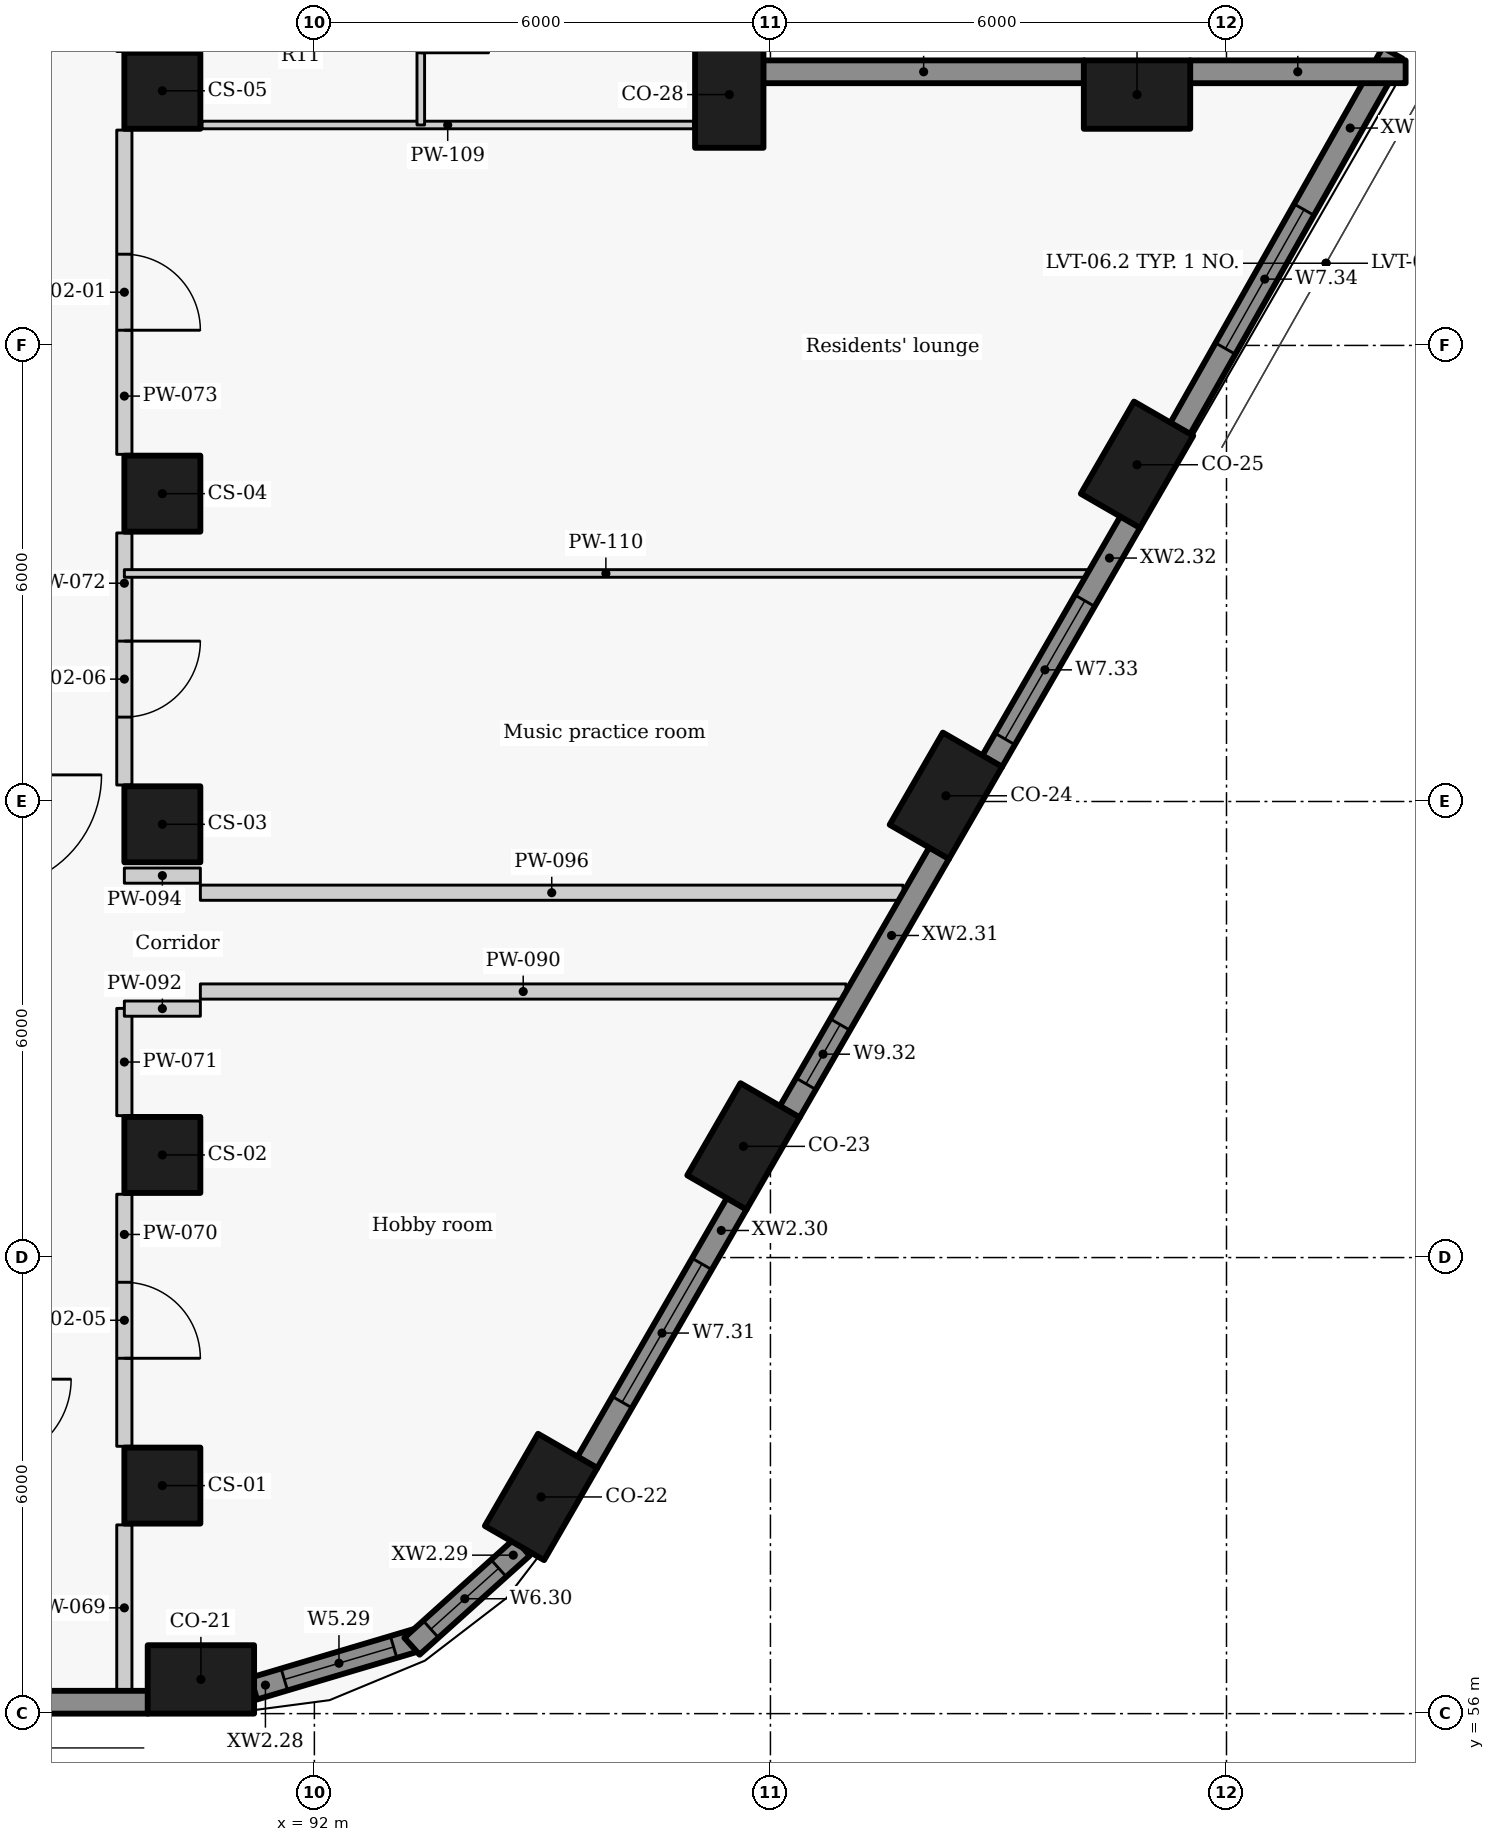
"""IFC4 building model, lengths in metres.
Left out: names, types, materials, properties, quantities, classifications, styles, units other than length and angle.
Written with IfcOpenShell. Run it as: python <this file> out.ifc"""

import sys

from ifc_helpers import new_model, si_unit, direction, frame, frame_2d, origin, origin_2d, place, context, subcontext, project, spatial, rectangle, extrude, element, fill, save


model = new_model("IFC4")
c1 = context("Model", 3, precision=1e-05, world=origin(), true_north=direction((0.0, 1.0)))
c2 = subcontext(c1, "Body", "Model", "MODEL_VIEW")
j1 = project(units=[si_unit("LENGTHUNIT", "METRE"), si_unit("PLANEANGLEUNIT", "RADIAN")], contexts=[c1])
p1 = place(None, origin())
s1 = spatial("IfcSite", under=j1, at=p1, CompositionType="ELEMENT")
p2 = place(p1, origin())
s2 = spatial("IfcBuilding", under=s1, at=p2, CompositionType="ELEMENT")
p3 = place(p2, frame((0.0, 0.0, 97.5)))
s3 = spatial("IfcBuildingStorey", under=s2, at=p3, CompositionType="ELEMENT", Elevation=97.5)
for number, where, z_axis, x_axis in (
    (1, (90.507, 56.45, 0.0), (0.0, 0.0, 1.0), (1.0, 0.0, 0.0)),
    (2, (94.982, 58.851, 0.0), (0.0, 0.0, 1.0), (0.5, 0.866, 0.0)),
    (3, (97.646, 63.463, 0.0), (0.0, 0.0, 1.0), (0.5, 0.866, 0.0)),
    (4, (100.308, 68.075, 0.0), (0.0, 0.0, 1.0), (0.5, 0.866, 0.0)),
    (5, (102.823, 72.43, 0.0), (0.0, 0.0, 1.0), (0.5, 0.866, 0.0)),
    (6, (102.823, 77.3, 0.0), (0.0, 0.0, 1.0), (-1.0, 0.0, 0.0)),
    (7, (97.458, 77.3, 0.0), (0.0, 0.0, 1.0), (0.0, 1.0, 0.0)),
):
    element("IfcColumn", number, at=place(p3, frame(where, z_axis=z_axis, x_axis=x_axis)), inside=s3, PredefinedType="COLUMN", context=c2, shape_type="SweptSolid", body=[
        extrude(rectangle(XDim=1.4, YDim=0.9, at=origin_2d()), origin(), (0.0, 0.0, 1.0), 3.3),
    ])
for number, where, z_axis, x_axis in (
    (8, (90.0, 59.0, 0.0), (0.0, 0.0, 1.0), (0.0, 1.0, 0.0)),
    (9, (90.0, 63.35, 0.0), (0.0, 0.0, 1.0), (0.0, 1.0, 0.0)),
    (10, (90.0, 67.7, 0.0), (0.0, 0.0, 1.0), (0.0, 1.0, 0.0)),
    (11, (90.0, 72.05, 0.0), (0.0, 0.0, 1.0), (0.0, 1.0, 0.0)),
    (12, (90.0, 77.35, 0.0), (0.0, 0.0, 1.0), (0.0, 1.0, 0.0)),
):
    element("IfcColumn", number, at=place(p3, frame(where, z_axis=z_axis, x_axis=x_axis)), inside=s3, PredefinedType="COLUMN", context=c2, shape_type="SweptSolid", body=[
        extrude(rectangle(XDim=1.0, YDim=1.0, at=origin_2d()), origin(), (0.0, 0.0, 1.0), 3.3),
    ])
p4 = place(p3, frame((69.871, 56.15, 0.0), z_axis=(0.0, 0.0, 1.0), x_axis=(1.0, 0.0, 0.0)))
e13 = element("IfcWall", 13, at=p4, inside=s3, PredefinedType="SOLIDWALL", context=c2, shape_type="SweptSolid", body=[
    extrude(rectangle(XDim=19.94, YDim=0.3, at=frame_2d((9.97, 0.0))), origin(), (0.0, 0.0, 1.0), 2.425),
])
p5 = place(p3, frame((91.203, 56.33, 0.0), z_axis=(0.0, 0.0, 1.0), x_axis=(0.95847736903, 0.285168604614, 0.0)))
e14 = element("IfcWall", 14, at=p5, inside=s3, PredefinedType="SOLIDWALL", context=c2, shape_type="SweptSolid", body=[
    extrude(rectangle(XDim=2.262, YDim=0.3, at=frame_2d((1.131, 0.0))), origin(), (0.0, 0.0, 1.0), 2.425),
])
p6 = place(p5, frame((0.419, 0.0, 0.9)))
e15 = element("IfcOpeningElement", 15, at=p6, cuts=e14, PredefinedType="OPENING", context=c2, shape_type="SweptSolid", body=[
    extrude(rectangle(XDim=1.5, YDim=1.1, at=frame_2d((0.75, 0.55))), frame((0.0, 0.16, 0.0), z_axis=(0.0, -1.0, 0.0), x_axis=(1.0, 0.0, 0.0)), (0.0, 0.0, 1.0), 0.32),
])
p7 = place(p3, frame((93.283, 56.887, 0.0), z_axis=(0.0, 0.0, 1.0), x_axis=(0.743785734967, 0.668418117992, 0.0)))
e16 = element("IfcWall", 16, at=p7, inside=s3, PredefinedType="SOLIDWALL", context=c2, shape_type="SweptSolid", body=[
    extrude(rectangle(XDim=1.95, YDim=0.3, at=frame_2d((0.975, 0.0))), origin(), (0.0, 0.0, 1.0), 2.425),
])
p8 = place(p7, frame((0.335, 0.0, 0.9)))
e17 = element("IfcOpeningElement", 17, at=p8, cuts=e16, PredefinedType="OPENING", context=c2, shape_type="SweptSolid", body=[
    extrude(rectangle(XDim=1.2, YDim=1.1, at=frame_2d((0.6, 0.55))), frame((0.0, 0.16, 0.0), z_axis=(0.0, -1.0, 0.0), x_axis=(1.0, 0.0, 0.0)), (0.0, 0.0, 1.0), 0.32),
])
p9 = place(p3, frame((95.59, 59.303, 0.0), z_axis=(0.0, 0.0, 1.0), x_axis=(0.500003583557, 0.866023334807, 0.0)))
e18 = element("IfcWall", 18, at=p9, inside=s3, PredefinedType="SOLIDWALL", context=c2, shape_type="SweptSolid", body=[
    extrude(rectangle(XDim=3.934, YDim=0.3, at=frame_2d((1.967, 0.0))), origin(), (0.0, 0.0, 1.0), 2.425),
])
p10 = place(p9, frame((0.917, 0.0, 0.9)))
e19 = element("IfcOpeningElement", 19, at=p10, cuts=e18, PredefinedType="OPENING", context=c2, shape_type="SweptSolid", body=[
    extrude(rectangle(XDim=2.1, YDim=1.1, at=frame_2d((1.05, 0.55))), frame((0.0, 0.16, 0.0), z_axis=(0.0, -1.0, 0.0), x_axis=(1.0, 0.0, 0.0)), (0.0, 0.0, 1.0), 0.32),
])
p11 = place(p3, frame((98.253, 63.916, 0.0), z_axis=(0.0, 0.0, 1.0), x_axis=(0.499957037901, 0.866050206543, 0.0)))
e20 = element("IfcWall", 20, at=p11, inside=s3, PredefinedType="SOLIDWALL", context=c2, shape_type="SweptSolid", body=[
    extrude(rectangle(XDim=3.934, YDim=0.3, at=frame_2d((1.967, 0.0))), origin(), (0.0, 0.0, 1.0), 2.425),
])
p12 = place(p11, frame((0.428, 0.0, 0.9)))
e21 = element("IfcOpeningElement", 21, at=p12, cuts=e20, PredefinedType="OPENING", context=c2, shape_type="SweptSolid", body=[
    extrude(rectangle(XDim=0.9, YDim=1.1, at=frame_2d((0.45, 0.55))), frame((0.0, 0.16, 0.0), z_axis=(0.0, -1.0, 0.0), x_axis=(1.0, 0.0, 0.0)), (0.0, 0.0, 1.0), 0.32),
])
p13 = place(p3, frame((100.916, 68.528, 0.0), z_axis=(0.0, 0.0, 1.0), x_axis=(0.500009139881, 0.866020126807, 0.0)))
e22 = element("IfcWall", 22, at=p13, inside=s3, PredefinedType="SOLIDWALL", context=c2, shape_type="SweptSolid", body=[
    extrude(rectangle(XDim=3.637, YDim=0.3, at=frame_2d((1.818, 0.0))), origin(), (0.0, 0.0, 1.0), 2.425),
])
p14 = place(p13, frame((0.34, 0.0, 0.9)))
e23 = element("IfcOpeningElement", 23, at=p14, cuts=e22, PredefinedType="OPENING", context=c2, shape_type="SweptSolid", body=[
    extrude(rectangle(XDim=2.1, YDim=1.1, at=frame_2d((1.05, 0.55))), frame((0.0, 0.16, 0.0), z_axis=(0.0, -1.0, 0.0), x_axis=(1.0, 0.0, 0.0)), (0.0, 0.0, 1.0), 0.32),
])
p15 = place(p3, frame((103.391, 72.906, 0.0), z_axis=(0.0, 0.0, 1.0), x_axis=(0.492456858874, 0.870336855561, 0.0)))
e24 = element("IfcWall", 24, at=p15, inside=s3, PredefinedType="SOLIDWALL", context=c2, shape_type="SweptSolid", body=[
    extrude(rectangle(XDim=5.677, YDim=0.3, at=frame_2d((2.838, 0.0))), origin(), (0.0, 0.0, 1.0), 2.425),
])
p16 = place(p15, frame((1.209, 0.0, 0.9)))
e25 = element("IfcOpeningElement", 25, at=p16, cuts=e24, PredefinedType="OPENING", context=c2, shape_type="SweptSolid", body=[
    extrude(rectangle(XDim=2.1, YDim=1.1, at=frame_2d((1.05, 0.55))), frame((0.0, 0.16, 0.0), z_axis=(0.0, -1.0, 0.0), x_axis=(1.0, 0.0, 0.0)), (0.0, 0.0, 1.0), 0.32),
])
p17 = place(p3, frame((106.357, 77.6, 0.0), z_axis=(0.0, 0.0, 1.0), x_axis=(-1.0, 0.0, 0.0)))
e26 = element("IfcWall", 26, at=p17, inside=s3, PredefinedType="SOLIDWALL", context=c2, shape_type="SweptSolid", body=[
    extrude(rectangle(XDim=2.838, YDim=0.3, at=frame_2d((1.419, 0.0))), origin(), (0.0, 0.0, 1.0), 2.425),
])
p18 = place(p3, frame((102.127, 77.6, 0.0), z_axis=(0.0, 0.0, 1.0), x_axis=(-1.0, 0.0, 0.0)))
e27 = element("IfcWall", 27, at=p18, inside=s3, PredefinedType="SOLIDWALL", context=c2, shape_type="SweptSolid", body=[
    extrude(rectangle(XDim=4.223, YDim=0.3, at=frame_2d((2.111, 0.0))), origin(), (0.0, 0.0, 1.0), 2.425),
])
p19 = place(p3, frame((89.5, 56.3, 0.0), z_axis=(0.0, 0.0, 1.0), x_axis=(0.0, 1.0, 0.0)))
e28 = element("IfcWall", 28, at=p19, inside=s3, PredefinedType="PARTITIONING", context=c2, shape_type="SweptSolid", body=[
    extrude(rectangle(XDim=2.183, YDim=0.2, at=frame_2d((1.091, 0.0))), origin(), (0.0, 0.0, 1.0), 3.025),
])
p20 = place(p3, frame((89.5, 62.833, 0.0), z_axis=(0.0, 0.0, 1.0), x_axis=(0.0, -1.0, 0.0)))
e29 = element("IfcWall", 29, at=p20, inside=s3, PredefinedType="PARTITIONING", context=c2, shape_type="SweptSolid", body=[
    extrude(rectangle(XDim=3.316, YDim=0.2, at=frame_2d((1.658, 0.0))), origin(), (0.0, 0.0, 1.0), 3.025),
])
p21 = place(p20, frame((1.158, 0.0, 0.0)))
e30 = element("IfcOpeningElement", 30, at=p21, cuts=e29, PredefinedType="OPENING", context=c2, shape_type="SweptSolid", body=[
    extrude(rectangle(XDim=1.0, YDim=2.1, at=frame_2d((0.5, 1.05))), frame((0.0, 0.11, 0.0), z_axis=(0.0, -1.0, 0.0), x_axis=(1.0, 0.0, 0.0)), (0.0, 0.0, 1.0), 0.22),
])
p22 = place(p3, frame((89.5, 63.867, 0.0), z_axis=(0.0, 0.0, 1.0), x_axis=(0.0, 1.0, 0.0)))
e31 = element("IfcWall", 31, at=p22, inside=s3, PredefinedType="PARTITIONING", context=c2, shape_type="SweptSolid", body=[
    extrude(rectangle(XDim=1.411, YDim=0.2, at=frame_2d((0.706, 0.0))), origin(), (0.0, 0.0, 1.0), 3.025),
])
p23 = place(p3, frame((89.5, 71.533, 0.0), z_axis=(0.0, 0.0, 1.0), x_axis=(0.0, -1.0, 0.0)))
e32 = element("IfcWall", 32, at=p23, inside=s3, PredefinedType="PARTITIONING", context=c2, shape_type="SweptSolid", body=[
    extrude(rectangle(XDim=3.316, YDim=0.2, at=frame_2d((1.658, 0.0))), origin(), (0.0, 0.0, 1.0), 3.025),
])
p24 = place(p23, frame((1.423, 0.0, 0.0)))
e33 = element("IfcOpeningElement", 33, at=p24, cuts=e32, PredefinedType="OPENING", context=c2, shape_type="SweptSolid", body=[
    extrude(rectangle(XDim=1.0, YDim=2.1, at=frame_2d((0.5, 1.05))), frame((0.0, 0.11, 0.0), z_axis=(0.0, -1.0, 0.0), x_axis=(1.0, 0.0, 0.0)), (0.0, 0.0, 1.0), 0.22),
])
p25 = place(p3, frame((89.5, 76.833, 0.0), z_axis=(0.0, 0.0, 1.0), x_axis=(0.0, -1.0, 0.0)))
e34 = element("IfcWall", 34, at=p25, inside=s3, PredefinedType="PARTITIONING", context=c2, shape_type="SweptSolid", body=[
    extrude(rectangle(XDim=4.266, YDim=0.2, at=frame_2d((2.133, 0.0))), origin(), (0.0, 0.0, 1.0), 3.025),
])
p26 = place(p25, frame((1.633, 0.0, 0.0)))
e35 = element("IfcOpeningElement", 35, at=p26, cuts=e34, PredefinedType="OPENING", context=c2, shape_type="SweptSolid", body=[
    extrude(rectangle(XDim=1.0, YDim=2.1, at=frame_2d((0.5, 1.05))), frame((0.0, 0.11, 0.0), z_axis=(0.0, -1.0, 0.0), x_axis=(1.0, 0.0, 0.0)), (0.0, 0.0, 1.0), 0.22),
])
p27 = place(p3, frame((90.5, 65.5, 0.0), z_axis=(0.0, 0.0, 1.0), x_axis=(1.0, 0.0, 0.0)))
e36 = element("IfcWall", 36, at=p27, inside=s3, PredefinedType="PARTITIONING", context=c2, shape_type="SweptSolid", body=[
    extrude(rectangle(XDim=8.495, YDim=0.2, at=frame_2d((4.248, 0.0))), origin(), (0.0, 0.0, 1.0), 2.405),
])
for number, where, z_axis, x_axis in (
    (37, (89.5, 65.275, 0.0), (0.0, 0.0, 1.0), (1.0, 0.0, 0.0)),
    (38, (89.5, 67.025, 0.0), (0.0, 0.0, 1.0), (1.0, 0.0, 0.0)),
):
    element("IfcWall", number, at=place(p3, frame(where, z_axis=z_axis, x_axis=x_axis)), inside=s3, PredefinedType="PARTITIONING", context=c2, shape_type="SweptSolid", body=[
        extrude(rectangle(XDim=1.0, YDim=0.2, at=frame_2d((0.5, 0.0))), origin(), (0.0, 0.0, 1.0), 2.505),
    ])
p28 = place(p3, frame((90.5, 66.8, 0.0), z_axis=(0.0, 0.0, 1.0), x_axis=(1.0, 0.0, 0.0)))
e39 = element("IfcWall", 39, at=p28, inside=s3, PredefinedType="PARTITIONING", context=c2, shape_type="SweptSolid", body=[
    extrude(rectangle(XDim=9.245, YDim=0.2, at=frame_2d((4.623, 0.0))), origin(), (0.0, 0.0, 1.0), 2.405),
])
p29 = place(p3, frame((90.52, 76.9, 0.0), z_axis=(0.0, 0.0, 1.0), x_axis=(1.0, 0.0, 0.0)))
e40 = element("IfcWall", 40, at=p29, inside=s3, PredefinedType="PARTITIONING", context=c2, shape_type="SweptSolid", body=[
    extrude(rectangle(XDim=6.468, YDim=0.1, at=frame_2d((3.234, 0.0))), origin(), (0.0, 0.0, 1.0), 3.025),
])
p30 = place(p3, frame((89.5, 71.0, 0.0), z_axis=(0.0, 0.0, 1.0), x_axis=(1.0, 0.0, 0.0)))
e41 = element("IfcWall", 41, at=p30, inside=s3, PredefinedType="PARTITIONING", context=c2, shape_type="SweptSolid", body=[
    extrude(rectangle(XDim=12.67, YDim=0.1, at=frame_2d((6.335, 0.0))), origin(), (0.0, 0.0, 1.0), 2.405),
])
p31 = place(p3, frame((93.4, 86.5, 0.0), z_axis=(0.0, 0.0, 1.0), x_axis=(0.0, -1.0, 0.0)))
e42 = element("IfcWall", 42, at=p31, inside=s3, PredefinedType="PARTITIONING", context=c2, shape_type="SweptSolid", body=[
    extrude(rectangle(XDim=9.6, YDim=0.1, at=frame_2d((4.8, 0.0))), origin(), (0.0, 0.0, 1.0), 3.025),
])
p32 = place(p31, frame((7.75, 0.0, 0.0)))
e43 = element("IfcOpeningElement", 43, at=p32, cuts=e42, PredefinedType="OPENING", context=c2, shape_type="SweptSolid", body=[
    extrude(rectangle(XDim=0.9, YDim=2.1, at=frame_2d((0.45, 1.05))), frame((0.0, 0.06, 0.0), z_axis=(0.0, -1.0, 0.0), x_axis=(1.0, 0.0, 0.0)), (0.0, 0.0, 1.0), 0.12),
])
p33 = place(p31, frame((4.35, 0.0, 0.0)))
e44 = element("IfcOpeningElement", 44, at=p33, cuts=e42, PredefinedType="OPENING", context=c2, shape_type="SweptSolid", body=[
    extrude(rectangle(XDim=0.9, YDim=2.1, at=frame_2d((0.45, 1.05))), frame((0.0, 0.06, 0.0), z_axis=(0.0, -1.0, 0.0), x_axis=(1.0, 0.0, 0.0)), (0.0, 0.0, 1.0), 0.12),
])
p34 = place(p31, frame((0.95, 0.0, 0.0)))
e45 = element("IfcOpeningElement", 45, at=p34, cuts=e42, PredefinedType="OPENING", context=c2, shape_type="SweptSolid", body=[
    extrude(rectangle(XDim=0.9, YDim=2.1, at=frame_2d((0.45, 1.05))), frame((0.0, 0.06, 0.0), z_axis=(0.0, -1.0, 0.0), x_axis=(1.0, 0.0, 0.0)), (0.0, 0.0, 1.0), 0.12),
])
p35 = place(p6, origin())
e46 = element("IfcWindow", 46, at=p35, inside=s3, PartitioningType="SINGLE_PANEL", PredefinedType="WINDOW", context=c2, shape_type="SweptSolid", body=[
    extrude(rectangle(XDim=1.5, YDim=1.1, at=frame_2d((0.75, 0.55))), frame((0.0, 0.03, 0.0), z_axis=(0.0, -1.0, 0.0), x_axis=(1.0, 0.0, 0.0)), (0.0, 0.0, 1.0), 0.06),
])
fill(e15, e46)
p36 = place(p8, origin())
e47 = element("IfcWindow", 47, at=p36, inside=s3, PartitioningType="SINGLE_PANEL", PredefinedType="WINDOW", context=c2, shape_type="SweptSolid", body=[
    extrude(rectangle(XDim=1.2, YDim=1.1, at=frame_2d((0.6, 0.55))), frame((0.0, 0.03, 0.0), z_axis=(0.0, -1.0, 0.0), x_axis=(1.0, 0.0, 0.0)), (0.0, 0.0, 1.0), 0.06),
])
fill(e17, e47)
p37 = place(p10, origin())
e48 = element("IfcWindow", 48, at=p37, inside=s3, PartitioningType="SINGLE_PANEL", PredefinedType="WINDOW", context=c2, shape_type="SweptSolid", body=[
    extrude(rectangle(XDim=2.1, YDim=1.1, at=frame_2d((1.05, 0.55))), frame((0.0, 0.03, 0.0), z_axis=(0.0, -1.0, 0.0), x_axis=(1.0, 0.0, 0.0)), (0.0, 0.0, 1.0), 0.06),
])
fill(e19, e48)
p38 = place(p12, origin())
e49 = element("IfcWindow", 49, at=p38, inside=s3, PartitioningType="SINGLE_PANEL", PredefinedType="WINDOW", context=c2, shape_type="SweptSolid", body=[
    extrude(rectangle(XDim=0.9, YDim=1.1, at=frame_2d((0.45, 0.55))), frame((0.0, 0.03, 0.0), z_axis=(0.0, -1.0, 0.0), x_axis=(1.0, 0.0, 0.0)), (0.0, 0.0, 1.0), 0.06),
])
fill(e21, e49)
p39 = place(p14, origin())
e50 = element("IfcWindow", 50, at=p39, inside=s3, PartitioningType="SINGLE_PANEL", PredefinedType="WINDOW", context=c2, shape_type="SweptSolid", body=[
    extrude(rectangle(XDim=2.1, YDim=1.1, at=frame_2d((1.05, 0.55))), frame((0.0, 0.03, 0.0), z_axis=(0.0, -1.0, 0.0), x_axis=(1.0, 0.0, 0.0)), (0.0, 0.0, 1.0), 0.06),
])
fill(e23, e50)
p40 = place(p16, origin())
e51 = element("IfcWindow", 51, at=p40, inside=s3, PartitioningType="SINGLE_PANEL", PredefinedType="WINDOW", context=c2, shape_type="SweptSolid", body=[
    extrude(rectangle(XDim=2.1, YDim=1.1, at=frame_2d((1.05, 0.55))), frame((0.0, 0.03, 0.0), z_axis=(0.0, -1.0, 0.0), x_axis=(1.0, 0.0, 0.0)), (0.0, 0.0, 1.0), 0.06),
])
fill(e25, e51)
p41 = place(p26, origin())
e52 = element("IfcDoor", 52, at=p41, inside=s3, OperationType="SINGLE_SWING_RIGHT", PredefinedType="DOOR", context=c2, shape_type="SweptSolid", body=[
    extrude(rectangle(XDim=1.0, YDim=2.1, at=frame_2d((0.5, 1.05))), frame((0.0, 0.025, 0.0), z_axis=(0.0, -1.0, 0.0), x_axis=(1.0, 0.0, 0.0)), (0.0, 0.0, 1.0), 0.05),
])
fill(e35, e52)
p42 = place(p21, origin())
e53 = element("IfcDoor", 53, at=p42, inside=s3, OperationType="SINGLE_SWING_RIGHT", PredefinedType="DOOR", context=c2, shape_type="SweptSolid", body=[
    extrude(rectangle(XDim=1.0, YDim=2.1, at=frame_2d((0.5, 1.05))), frame((0.0, 0.025, 0.0), z_axis=(0.0, -1.0, 0.0), x_axis=(1.0, 0.0, 0.0)), (0.0, 0.0, 1.0), 0.05),
])
fill(e30, e53)
p43 = place(p24, origin())
e54 = element("IfcDoor", 54, at=p43, inside=s3, OperationType="SINGLE_SWING_LEFT", PredefinedType="DOOR", context=c2, shape_type="SweptSolid", body=[
    extrude(rectangle(XDim=1.0, YDim=2.1, at=frame_2d((0.5, 1.05))), frame((0.0, 0.025, 0.0), z_axis=(0.0, -1.0, 0.0), x_axis=(1.0, 0.0, 0.0)), (0.0, 0.0, 1.0), 0.05),
])
fill(e33, e54)
save(model, sys.argv[1])
